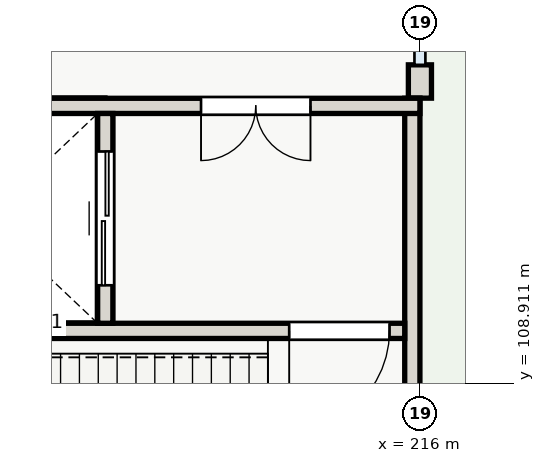
"""IFC4 building model, lengths in metres.
Left out: names, types, materials, properties, quantities, classifications, styles, units other than length and angle.
Written with IfcOpenShell. Run it as: python <this file> out.ifc"""

import sys

from ifc_helpers import new_model, si_unit, direction, frame, frame_2d, origin, place, context, subcontext, project, spatial, rectangle, extrude, element, fill, save


model = new_model("IFC4")
c1 = context("Model", 3, precision=1e-05, world=origin(), true_north=direction((0.0, 1.0)))
c2 = subcontext(c1, "Body", "Model", "MODEL_VIEW")
j1 = project(units=[si_unit("LENGTHUNIT", "METRE"), si_unit("PLANEANGLEUNIT", "RADIAN")], contexts=[c1])
p1 = place(None, origin())
s1 = spatial("IfcSite", under=j1, at=p1, CompositionType="ELEMENT")
p2 = place(p1, origin())
s2 = spatial("IfcBuilding", under=s1, at=p2, CompositionType="ELEMENT")
p3 = place(p2, origin())
s3 = spatial("IfcBuildingStorey", under=s2, at=p3, CompositionType="ELEMENT", Elevation=0.0)
p4 = place(p3, frame((216.0, 114.15, 0.0), z_axis=(0.0, 0.0, 1.0), x_axis=(0.0, -1.0, 0.0)))
e1 = element("IfcWall", 1, at=p4, inside=s3, PredefinedType="SOLIDWALL", context=c2, shape_type="SweptSolid", body=[
    extrude(rectangle(XDim=0.548, YDim=0.38, at=frame_2d((0.274, 0.0))), origin(), (0.0, 0.0, 1.0), 3.35),
])
p5 = place(p3, frame((210.82, 109.78, -1.6), z_axis=(0.0, 0.0, 1.0), x_axis=(0.0, 1.0, 0.0)))
e2 = element("IfcWall", 2, at=p5, inside=s3, PredefinedType="SHEAR", context=c2, shape_type="SweptSolid", body=[
    extrude(rectangle(XDim=3.7, YDim=0.25, at=frame_2d((1.85, 0.0))), origin(), (0.0, 0.0, 1.0), 1.6),
])
for number, where, z_axis, x_axis in (
    (3, (210.82, 113.48, -1.6), (0.0, 0.0, 1.0), (-1.0, 0.0, 0.0)),
    (4, (206.92, 109.78, -1.6), (0.0, 0.0, 1.0), (1.0, 0.0, 0.0)),
):
    element("IfcWall", number, at=place(p3, frame(where, z_axis=z_axis, x_axis=x_axis)), inside=s3, PredefinedType="SHEAR", context=c2, shape_type="SweptSolid", body=[
        extrude(rectangle(XDim=3.9, YDim=0.25, at=frame_2d((1.95, 0.0))), origin(), (0.0, 0.0, 1.0), 1.6),
    ])
p6 = place(p3, frame((215.875, 113.6, 0.0), z_axis=(0.0, 0.0, 1.0), x_axis=(0.0, -1.0, 0.0)))
e5 = element("IfcWall", 5, at=p6, inside=s3, PredefinedType="SHEAR", context=c2, shape_type="SweptSolid", body=[
    extrude(rectangle(XDim=9.2, YDim=0.25, at=frame_2d((4.6, 0.0))), origin(), (0.0, 0.0, 1.0), 4.2),
])
p7 = place(p6, frame((5.9, 0.0, 0.0)))
e6 = element("IfcOpeningElement", 6, at=p7, cuts=e5, PredefinedType="OPENING", context=c2, shape_type="SweptSolid", body=[
    extrude(rectangle(XDim=1.9, YDim=2.2, at=frame_2d((0.95, 1.1))), frame((0.0, 0.135, 0.0), z_axis=(0.0, -1.0, 0.0), x_axis=(1.0, 0.0, 0.0)), (0.0, 0.0, 1.0), 0.27),
])
p8 = place(p3, frame((216.0, 113.475, 0.0), z_axis=(0.0, 0.0, 1.0), x_axis=(-1.0, 0.0, 0.0)))
e7 = element("IfcWall", 7, at=p8, inside=s3, PredefinedType="SHEAR", context=c2, shape_type="SweptSolid", body=[
    extrude(rectangle(XDim=9.2, YDim=0.25, at=frame_2d((4.6, 0.0))), origin(), (0.0, 0.0, 1.0), 4.2),
])
p9 = place(p8, frame((1.8, 0.0, 0.0)))
e8 = element("IfcOpeningElement", 8, at=p9, cuts=e7, PredefinedType="OPENING", context=c2, shape_type="SweptSolid", body=[
    extrude(rectangle(XDim=1.8, YDim=2.15, at=frame_2d((0.9, 1.075))), frame((0.0, 0.135, 0.0), z_axis=(0.0, -1.0, 0.0), x_axis=(1.0, 0.0, 0.0)), (0.0, 0.0, 1.0), 0.27),
])
p10 = place(p3, frame((215.75, 109.775, 0.0), z_axis=(0.0, 0.0, 1.0), x_axis=(-1.0, 0.0, 0.0)))
e9 = element("IfcWall", 9, at=p10, inside=s3, PredefinedType="SHEAR", context=c2, shape_type="SweptSolid", body=[
    extrude(rectangle(XDim=8.7, YDim=0.25, at=frame_2d((4.35, 0.0))), origin(), (0.0, 0.0, 1.0), 4.2),
])
p11 = place(p10, frame((0.25, 0.0, 0.0)))
e10 = element("IfcOpeningElement", 10, at=p11, cuts=e9, PredefinedType="OPENING", context=c2, shape_type="SweptSolid", body=[
    extrude(rectangle(XDim=1.65, YDim=2.1, at=frame_2d((0.825, 1.05))), frame((0.0, 0.135, 0.0), z_axis=(0.0, -1.0, 0.0), x_axis=(1.0, 0.0, 0.0)), (0.0, 0.0, 1.0), 0.27),
])
p12 = place(p3, frame((210.825, 109.9, 0.0), z_axis=(0.0, 0.0, 1.0), x_axis=(0.0, 1.0, 0.0)))
e11 = element("IfcWall", 11, at=p12, inside=s3, PredefinedType="SHEAR", context=c2, shape_type="SweptSolid", body=[
    extrude(rectangle(XDim=3.45, YDim=0.25, at=frame_2d((1.725, 0.0))), origin(), (0.0, 0.0, 1.0), 4.2),
])
p13 = place(p12, frame((0.625, 0.0, 0.0)))
e12 = element("IfcOpeningElement", 12, at=p13, cuts=e11, PredefinedType="OPENING", context=c2, shape_type="SweptSolid", body=[
    extrude(rectangle(XDim=2.2, YDim=2.35, at=frame_2d((1.1, 1.175))), frame((0.0, 0.135, 0.0), z_axis=(0.0, -1.0, 0.0), x_axis=(1.0, 0.0, 0.0)), (0.0, 0.0, 1.0), 0.27),
])
p14 = place(p9, origin())
e13 = element("IfcDoor", 13, at=p14, inside=s3, OperationType="DOUBLE_DOOR_SINGLE_SWING", PredefinedType="DOOR", context=c2, shape_type="SweptSolid", body=[
    extrude(rectangle(XDim=1.8, YDim=2.15, at=frame_2d((0.9, 1.075))), frame((0.0, 0.025, 0.0), z_axis=(0.0, -1.0, 0.0), x_axis=(1.0, 0.0, 0.0)), (0.0, 0.0, 1.0), 0.05),
])
fill(e8, e13)
p15 = place(p11, origin())
e14 = element("IfcDoor", 14, at=p15, inside=s3, OperationType="SINGLE_SWING_RIGHT", PredefinedType="DOOR", context=c2, shape_type="SweptSolid", body=[
    extrude(rectangle(XDim=1.65, YDim=2.1, at=frame_2d((0.825, 1.05))), frame((0.0, 0.025, 0.0), z_axis=(0.0, -1.0, 0.0), x_axis=(1.0, 0.0, 0.0)), (0.0, 0.0, 1.0), 0.05),
])
fill(e10, e14)
p16 = place(p13, origin())
e15 = element("IfcDoor", 15, at=p16, inside=s3, OperationType="SLIDING_TO_LEFT", PredefinedType="DOOR", context=c2, shape_type="SweptSolid", body=[
    extrude(rectangle(XDim=2.2, YDim=2.35, at=frame_2d((1.1, 1.175))), frame((0.0, 0.025, 0.0), z_axis=(0.0, -1.0, 0.0), x_axis=(1.0, 0.0, 0.0)), (0.0, 0.0, 1.0), 0.05),
])
fill(e12, e15)
save(model, sys.argv[1])
